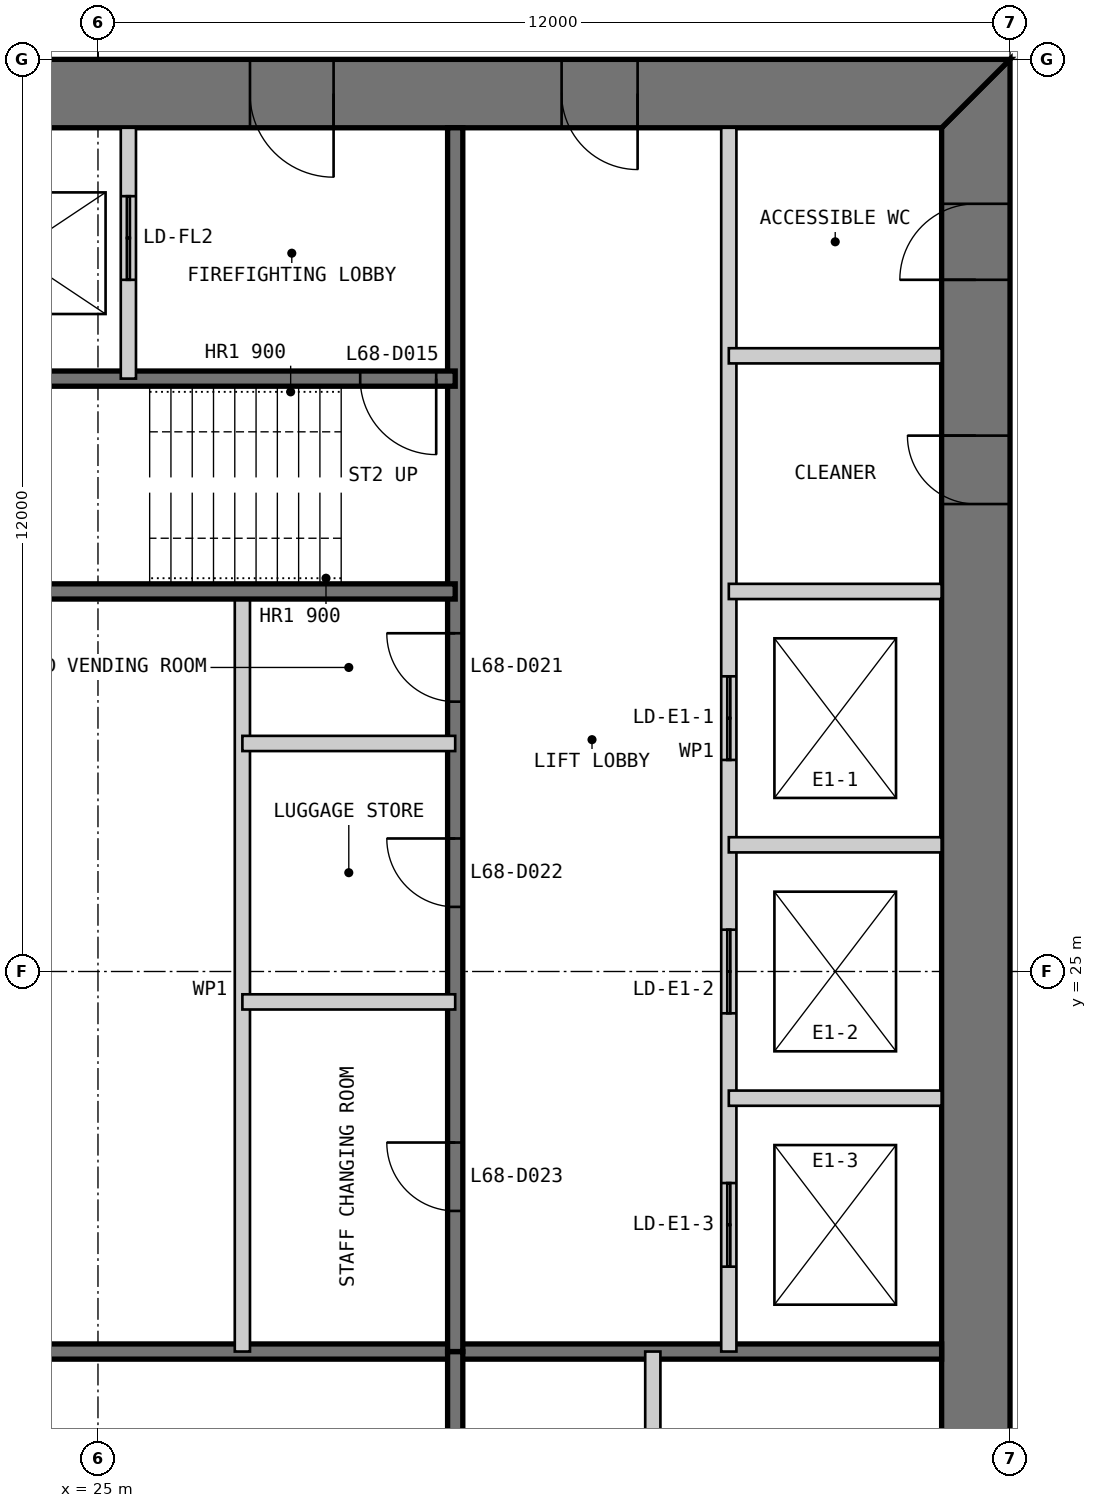
"""IFC4 building model, lengths in metres.
Left out: names, types, materials, properties, quantities, classifications, styles, units other than length and angle.
Written with IfcOpenShell. Run it as: python <this file> out.ifc"""

import sys

from ifc_helpers import new_model, si_unit, direction, frame, frame_2d, origin, place, context, subcontext, project, spatial, polyline, rectangle, outline, extrude, element, fill, save


model = new_model("IFC4")
c1 = context("Model", 3, precision=1e-05, world=origin(), true_north=direction((0.0, 1.0)))
c2 = subcontext(c1, "Body", "Model", "MODEL_VIEW")
j1 = project(units=[si_unit("LENGTHUNIT", "METRE"), si_unit("PLANEANGLEUNIT", "RADIAN")], contexts=[c1])
p1 = place(None, origin())
s1 = spatial("IfcSite", under=j1, at=p1, CompositionType="ELEMENT")
p2 = place(p1, origin())
s2 = spatial("IfcBuilding", under=s1, at=p2, CompositionType="ELEMENT")
p3 = place(p2, frame((0.0, 0.0, 283.2)))
s3 = spatial("IfcBuildingStorey", under=s2, at=p3, CompositionType="ELEMENT", Elevation=283.2)
p4 = place(p3, frame((36.55, 13.9, 0.0), z_axis=(0.0, 0.0, 1.0), x_axis=(0.0, 1.0, 0.0)))
e1 = element("IfcWall", 1, at=p4, inside=s3, PredefinedType="SHEAR", context=c2, shape_type="SweptSolid", body=[
    extrude(outline(polyline([(-0.9, -0.45), (23.1, -0.45), (22.2, 0.45), (0.0, 0.45), (-0.9, -0.45)])), origin(), (0.0, 0.0, 1.0), 3.4),
])
p5 = place(p4, frame((20.2, 0.0, 0.0)))
e2 = element("IfcOpeningElement", 2, at=p5, cuts=e1, PredefinedType="OPENING", context=c2, shape_type="SweptSolid", body=[
    extrude(rectangle(XDim=1.0, YDim=2.2, at=frame_2d((0.5, 1.1))), frame((0.0, 0.46, 0.0), z_axis=(0.0, -1.0, 0.0), x_axis=(1.0, 0.0, 0.0)), (0.0, 0.0, 1.0), 0.92),
])
p6 = place(p4, frame((17.25, 0.0, 0.0)))
e3 = element("IfcOpeningElement", 3, at=p6, cuts=e1, PredefinedType="OPENING", context=c2, shape_type="SweptSolid", body=[
    extrude(rectangle(XDim=0.9, YDim=2.2, at=frame_2d((0.45, 1.1))), frame((0.0, 0.46, 0.0), z_axis=(0.0, -1.0, 0.0), x_axis=(1.0, 0.0, 0.0)), (0.0, 0.0, 1.0), 0.92),
])
p7 = place(p3, frame((37.0, 36.55, 0.0), z_axis=(0.0, 0.0, 1.0), x_axis=(-1.0, 0.0, 0.0)))
e4 = element("IfcWall", 4, at=p7, inside=s3, PredefinedType="SHEAR", context=c2, shape_type="SweptSolid", body=[
    extrude(outline(polyline([(0.0, -0.45), (24.0, -0.45), (23.1, 0.45), (0.9, 0.45), (0.0, -0.45)])), origin(), (0.0, 0.0, 1.0), 3.4),
])
p8 = place(p7, frame((4.9, 0.0, 0.0)))
e5 = element("IfcOpeningElement", 5, at=p8, cuts=e4, PredefinedType="OPENING", context=c2, shape_type="SweptSolid", body=[
    extrude(rectangle(XDim=1.0, YDim=2.2, at=frame_2d((0.5, 1.1))), frame((0.0, 0.46, 0.0), z_axis=(0.0, -1.0, 0.0), x_axis=(1.0, 0.0, 0.0)), (0.0, 0.0, 1.0), 0.92),
])
p9 = place(p7, frame((8.9, 0.0, 0.0)))
e6 = element("IfcOpeningElement", 6, at=p9, cuts=e4, PredefinedType="OPENING", context=c2, shape_type="SweptSolid", body=[
    extrude(rectangle(XDim=1.1, YDim=2.2, at=frame_2d((0.55, 1.1))), frame((0.0, 0.46, 0.0), z_axis=(0.0, -1.0, 0.0), x_axis=(1.0, 0.0, 0.0)), (0.0, 0.0, 1.0), 0.92),
])
p10 = place(p7, frame((15.05, 0.0, 0.0)))
e7 = element("IfcOpeningElement", 7, at=p10, cuts=e4, PredefinedType="OPENING", context=c2, shape_type="SweptSolid", body=[
    extrude(rectangle(XDim=0.9, YDim=2.2, at=frame_2d((0.45, 1.1))), frame((0.0, 0.46, 0.0), z_axis=(0.0, -1.0, 0.0), x_axis=(1.0, 0.0, 0.0)), (0.0, 0.0, 1.0), 0.92),
])
p11 = place(p7, frame((17.9, 0.0, 0.0)))
e8 = element("IfcOpeningElement", 8, at=p11, cuts=e4, PredefinedType="OPENING", context=c2, shape_type="SweptSolid", body=[
    extrude(rectangle(XDim=1.0, YDim=2.2, at=frame_2d((0.5, 1.1))), frame((0.0, 0.46, 0.0), z_axis=(0.0, -1.0, 0.0), x_axis=(1.0, 0.0, 0.0)), (0.0, 0.0, 1.0), 0.92),
])
p12 = place(p7, frame((21.4, 0.0, 0.0)))
e9 = element("IfcOpeningElement", 9, at=p12, cuts=e4, PredefinedType="OPENING", context=c2, shape_type="SweptSolid", body=[
    extrude(rectangle(XDim=1.0, YDim=2.2, at=frame_2d((0.5, 1.1))), frame((0.0, 0.46, 0.0), z_axis=(0.0, -1.0, 0.0), x_axis=(1.0, 0.0, 0.0)), (0.0, 0.0, 1.0), 0.92),
])
p13 = place(p3, frame((20.3, 20.0, 0.0), z_axis=(0.0, 0.0, 1.0), x_axis=(1.0, 0.0, 0.0)))
e10 = element("IfcWall", 10, at=p13, inside=s3, PredefinedType="SOLIDWALL", context=c2, shape_type="SweptSolid", body=[
    extrude(rectangle(XDim=15.8, YDim=0.2, at=frame_2d((7.9, 0.0))), origin(), (0.0, 0.0, 1.0), 3.2),
])
p14 = place(p3, frame((29.7, 13.9, 0.0), z_axis=(0.0, 0.0, 1.0), x_axis=(0.0, 1.0, 0.0)))
e11 = element("IfcWall", 11, at=p14, inside=s3, PredefinedType="SOLIDWALL", context=c2, shape_type="SweptSolid", body=[
    extrude(rectangle(XDim=6.1, YDim=0.2, at=frame_2d((3.05, 0.0))), origin(), (0.0, 0.0, 1.0), 3.2),
])
p15 = place(p3, frame((32.3, 13.9, 0.0), z_axis=(0.0, 0.0, 1.0), x_axis=(0.0, 1.0, 0.0)))
e12 = element("IfcWall", 12, at=p15, inside=s3, PredefinedType="PARTITIONING", context=c2, shape_type="SweptSolid", body=[
    extrude(rectangle(XDim=6.1, YDim=0.2, at=frame_2d((3.05, 0.0))), origin(), (0.0, 0.0, 1.0), 3.2),
])
p16 = place(p3, frame((33.3, 36.1, 0.0), z_axis=(0.0, 0.0, 1.0), x_axis=(0.0, -1.0, 0.0)))
e13 = element("IfcWall", 13, at=p16, inside=s3, PredefinedType="PARTITIONING", context=c2, shape_type="SweptSolid", body=[
    extrude(rectangle(XDim=16.1, YDim=0.2, at=frame_2d((8.05, 0.0))), origin(), (0.0, 0.0, 1.0), 3.2),
])
p17 = place(p16, frame((7.217, 0.0, 0.0)))
e14 = element("IfcOpeningElement", 14, at=p17, cuts=e13, PredefinedType="OPENING", context=c2, shape_type="SweptSolid", body=[
    extrude(rectangle(XDim=1.1, YDim=2.2, at=frame_2d((0.55, 1.1))), frame((0.0, 0.11, 0.0), z_axis=(0.0, -1.0, 0.0), x_axis=(1.0, 0.0, 0.0)), (0.0, 0.0, 1.0), 0.22),
])
p18 = place(p16, frame((10.55, 0.0, 0.0)))
e15 = element("IfcOpeningElement", 15, at=p18, cuts=e13, PredefinedType="OPENING", context=c2, shape_type="SweptSolid", body=[
    extrude(rectangle(XDim=1.1, YDim=2.2, at=frame_2d((0.55, 1.1))), frame((0.0, 0.11, 0.0), z_axis=(0.0, -1.0, 0.0), x_axis=(1.0, 0.0, 0.0)), (0.0, 0.0, 1.0), 0.22),
])
p19 = place(p16, frame((13.883, 0.0, 0.0)))
e16 = element("IfcOpeningElement", 16, at=p19, cuts=e13, PredefinedType="OPENING", context=c2, shape_type="SweptSolid", body=[
    extrude(rectangle(XDim=1.1, YDim=2.2, at=frame_2d((0.55, 1.1))), frame((0.0, 0.11, 0.0), z_axis=(0.0, -1.0, 0.0), x_axis=(1.0, 0.0, 0.0)), (0.0, 0.0, 1.0), 0.22),
])
p20 = place(p3, frame((29.7, 36.1, 0.0), z_axis=(0.0, 0.0, 1.0), x_axis=(0.0, -1.0, 0.0)))
e17 = element("IfcWall", 17, at=p20, inside=s3, PredefinedType="SOLIDWALL", context=c2, shape_type="SweptSolid", body=[
    extrude(rectangle(XDim=16.1, YDim=0.2, at=frame_2d((8.05, 0.0))), origin(), (0.0, 0.0, 1.0), 3.2),
])
p21 = place(p20, frame((6.65, 0.0, 0.0)))
e18 = element("IfcOpeningElement", 18, at=p21, cuts=e17, PredefinedType="OPENING", context=c2, shape_type="SweptSolid", body=[
    extrude(rectangle(XDim=0.9, YDim=2.2, at=frame_2d((0.45, 1.1))), frame((0.0, 0.11, 0.0), z_axis=(0.0, -1.0, 0.0), x_axis=(1.0, 0.0, 0.0)), (0.0, 0.0, 1.0), 0.22),
])
p22 = place(p20, frame((9.35, 0.0, 0.0)))
e19 = element("IfcOpeningElement", 19, at=p22, cuts=e17, PredefinedType="OPENING", context=c2, shape_type="SweptSolid", body=[
    extrude(rectangle(XDim=0.9, YDim=2.2, at=frame_2d((0.45, 1.1))), frame((0.0, 0.11, 0.0), z_axis=(0.0, -1.0, 0.0), x_axis=(1.0, 0.0, 0.0)), (0.0, 0.0, 1.0), 0.22),
])
p23 = place(p20, frame((13.35, 0.0, 0.0)))
e20 = element("IfcOpeningElement", 20, at=p23, cuts=e17, PredefinedType="OPENING", context=c2, shape_type="SweptSolid", body=[
    extrude(rectangle(XDim=0.9, YDim=2.2, at=frame_2d((0.45, 1.1))), frame((0.0, 0.11, 0.0), z_axis=(0.0, -1.0, 0.0), x_axis=(1.0, 0.0, 0.0)), (0.0, 0.0, 1.0), 0.22),
])
for number, where, z_axis, x_axis in (
    (21, (36.1, 30.0, 0.0), (0.0, 0.0, 1.0), (-1.0, 0.0, 0.0)),
    (22, (36.1, 26.667, 0.0), (0.0, 0.0, 1.0), (-1.0, 0.0, 0.0)),
    (23, (36.1, 23.333, 0.0), (0.0, 0.0, 1.0), (-1.0, 0.0, 0.0)),
):
    element("IfcWall", number, at=place(p3, frame(where, z_axis=z_axis, x_axis=x_axis)), inside=s3, PredefinedType="PARTITIONING", context=c2, shape_type="SweptSolid", body=[
        extrude(rectangle(XDim=2.8, YDim=0.2, at=frame_2d((1.4, 0.0))), origin(), (0.0, 0.0, 1.0), 3.2),
    ])
p24 = place(p3, frame((26.9, 30.0, 0.0), z_axis=(0.0, 0.0, 1.0), x_axis=(0.0, -1.0, 0.0)))
e24 = element("IfcWall", 24, at=p24, inside=s3, PredefinedType="PARTITIONING", context=c2, shape_type="SweptSolid", body=[
    extrude(rectangle(XDim=10.0, YDim=0.2, at=frame_2d((5.0, 0.0))), origin(), (0.0, 0.0, 1.0), 3.2),
])
p25 = place(p3, frame((29.7, 32.8, 0.0), z_axis=(0.0, 0.0, 1.0), x_axis=(-1.0, 0.0, 0.0)))
e25 = element("IfcWall", 25, at=p25, inside=s3, PredefinedType="SOLIDWALL", context=c2, shape_type="SweptSolid", body=[
    extrude(rectangle(XDim=9.4, YDim=0.2, at=frame_2d((4.7, 0.0))), origin(), (0.0, 0.0, 1.0), 3.2),
])
p26 = place(p25, frame((0.25, 0.0, 0.0)))
e26 = element("IfcOpeningElement", 26, at=p26, cuts=e25, PredefinedType="OPENING", context=c2, shape_type="SweptSolid", body=[
    extrude(rectangle(XDim=1.0, YDim=2.2, at=frame_2d((0.5, 1.1))), frame((0.0, 0.11, 0.0), z_axis=(0.0, -1.0, 0.0), x_axis=(1.0, 0.0, 0.0)), (0.0, 0.0, 1.0), 0.22),
])
p27 = place(p3, frame((29.7, 30.0, 0.0), z_axis=(0.0, 0.0, 1.0), x_axis=(-1.0, 0.0, 0.0)))
e27 = element("IfcWall", 27, at=p27, inside=s3, PredefinedType="SOLIDWALL", context=c2, shape_type="SweptSolid", body=[
    extrude(rectangle(XDim=15.8, YDim=0.2, at=frame_2d((7.9, 0.0))), origin(), (0.0, 0.0, 1.0), 3.2),
])
p28 = place(p3, frame((25.4, 36.1, 0.0), z_axis=(0.0, 0.0, 1.0), x_axis=(0.0, -1.0, 0.0)))
e28 = element("IfcWall", 28, at=p28, inside=s3, PredefinedType="PARTITIONING", context=c2, shape_type="SweptSolid", body=[
    extrude(rectangle(XDim=3.3, YDim=0.2, at=frame_2d((1.65, 0.0))), origin(), (0.0, 0.0, 1.0), 3.2),
])
p29 = place(p28, frame((0.9, 0.0, 0.0)))
e29 = element("IfcOpeningElement", 29, at=p29, cuts=e28, PredefinedType="OPENING", context=c2, shape_type="SweptSolid", body=[
    extrude(rectangle(XDim=1.1, YDim=2.2, at=frame_2d((0.55, 1.1))), frame((0.0, 0.11, 0.0), z_axis=(0.0, -1.0, 0.0), x_axis=(1.0, 0.0, 0.0)), (0.0, 0.0, 1.0), 0.22),
])
for number, where, z_axis, x_axis in (
    (30, (36.1, 33.1, 0.0), (0.0, 0.0, 1.0), (-1.0, 0.0, 0.0)),
    (31, (29.7, 28.0, 0.0), (0.0, 0.0, 1.0), (-1.0, 0.0, 0.0)),
    (32, (29.7, 24.6, 0.0), (0.0, 0.0, 1.0), (-1.0, 0.0, 0.0)),
):
    element("IfcWall", number, at=place(p3, frame(where, z_axis=z_axis, x_axis=x_axis)), inside=s3, PredefinedType="PARTITIONING", context=c2, shape_type="SweptSolid", body=[
        extrude(rectangle(XDim=2.8, YDim=0.2, at=frame_2d((1.4, 0.0))), origin(), (0.0, 0.0, 1.0), 3.2),
    ])
p30 = place(p8, origin())
e33 = element("IfcDoor", 33, at=p30, inside=s3, OperationType="SINGLE_SWING_LEFT", PredefinedType="DOOR", context=c2, shape_type="SweptSolid", body=[
    extrude(rectangle(XDim=1.0, YDim=2.2, at=frame_2d((0.5, 1.1))), frame((0.0, 0.025, 0.0), z_axis=(0.0, -1.0, 0.0), x_axis=(1.0, 0.0, 0.0)), (0.0, 0.0, 1.0), 0.05),
    extrude(outline(polyline([(0.0, 0.0), (0.04, 0.0), (0.04, 2.16), (0.96, 2.16), (0.96, 0.0), (1.0, 0.0), (1.0, 2.2), (0.0, 2.2), (0.0, 0.0)])), frame((0.0, 0.3, 0.0), z_axis=(0.0, -1.0, 0.0), x_axis=(1.0, 0.0, 0.0)), (0.0, 0.0, 1.0), 0.6),
])
fill(e5, e33)
p31 = place(p9, origin())
e34 = element("IfcDoor", 34, at=p31, inside=s3, OperationType="SINGLE_SWING_LEFT", PredefinedType="DOOR", context=c2, shape_type="SweptSolid", body=[
    extrude(rectangle(XDim=1.1, YDim=2.2, at=frame_2d((0.55, 1.1))), frame((0.0, 0.025, 0.0), z_axis=(0.0, -1.0, 0.0), x_axis=(1.0, 0.0, 0.0)), (0.0, 0.0, 1.0), 0.05),
    extrude(outline(polyline([(0.0, 0.0), (0.04, 0.0), (0.04, 2.16), (1.06, 2.16), (1.06, 0.0), (1.1, 0.0), (1.1, 2.2), (0.0, 2.2), (0.0, 0.0)])), frame((0.0, 0.3, 0.0), z_axis=(0.0, -1.0, 0.0), x_axis=(1.0, 0.0, 0.0)), (0.0, 0.0, 1.0), 0.6),
])
fill(e6, e34)
p32 = place(p26, origin())
e35 = element("IfcDoor", 35, at=p32, inside=s3, OperationType="SINGLE_SWING_LEFT", PredefinedType="DOOR", context=c2, shape_type="SweptSolid", body=[
    extrude(rectangle(XDim=1.0, YDim=2.2, at=frame_2d((0.5, 1.1))), frame((0.0, 0.025, 0.0), z_axis=(0.0, -1.0, 0.0), x_axis=(1.0, 0.0, 0.0)), (0.0, 0.0, 1.0), 0.05),
])
fill(e26, e35)
p33 = place(p5, origin())
e36 = element("IfcDoor", 36, at=p33, inside=s3, OperationType="SINGLE_SWING_LEFT", PredefinedType="DOOR", context=c2, shape_type="SweptSolid", body=[
    extrude(rectangle(XDim=1.0, YDim=2.2, at=frame_2d((0.5, 1.1))), frame((0.0, 0.025, 0.0), z_axis=(0.0, -1.0, 0.0), x_axis=(1.0, 0.0, 0.0)), (0.0, 0.0, 1.0), 0.05),
    extrude(outline(polyline([(0.0, 0.0), (0.04, 0.0), (0.04, 2.16), (0.96, 2.16), (0.96, 0.0), (1.0, 0.0), (1.0, 2.2), (0.0, 2.2), (0.0, 0.0)])), frame((0.0, 0.3, 0.0), z_axis=(0.0, -1.0, 0.0), x_axis=(1.0, 0.0, 0.0)), (0.0, 0.0, 1.0), 0.6),
])
fill(e2, e36)
p34 = place(p6, origin())
e37 = element("IfcDoor", 37, at=p34, inside=s3, OperationType="SINGLE_SWING_RIGHT", PredefinedType="DOOR", context=c2, shape_type="SweptSolid", body=[
    extrude(rectangle(XDim=0.9, YDim=2.2, at=frame_2d((0.45, 1.1))), frame((0.0, 0.025, 0.0), z_axis=(0.0, -1.0, 0.0), x_axis=(1.0, 0.0, 0.0)), (0.0, 0.0, 1.0), 0.05),
    extrude(outline(polyline([(0.0, 0.0), (0.04, 0.0), (0.04, 2.16), (0.86, 2.16), (0.86, 0.0), (0.9, 0.0), (0.9, 2.2), (0.0, 2.2), (0.0, 0.0)])), frame((0.0, 0.3, 0.0), z_axis=(0.0, -1.0, 0.0), x_axis=(1.0, 0.0, 0.0)), (0.0, 0.0, 1.0), 0.6),
])
fill(e3, e37)
p35 = place(p21, frame((0.9, 0.0, 0.0), z_axis=(0.0, 0.0, 1.0), x_axis=(-1.0, 0.0, 0.0)))
e38 = element("IfcDoor", 38, at=p35, inside=s3, OperationType="SINGLE_SWING_RIGHT", PredefinedType="DOOR", context=c2, shape_type="SweptSolid", body=[
    extrude(rectangle(XDim=0.9, YDim=2.2, at=frame_2d((0.45, 1.1))), frame((0.0, 0.025, 0.0), z_axis=(0.0, -1.0, 0.0), x_axis=(1.0, 0.0, 0.0)), (0.0, 0.0, 1.0), 0.05),
])
fill(e18, e38)
p36 = place(p22, frame((0.9, 0.0, 0.0), z_axis=(0.0, 0.0, 1.0), x_axis=(-1.0, 0.0, 0.0)))
e39 = element("IfcDoor", 39, at=p36, inside=s3, OperationType="SINGLE_SWING_RIGHT", PredefinedType="DOOR", context=c2, shape_type="SweptSolid", body=[
    extrude(rectangle(XDim=0.9, YDim=2.2, at=frame_2d((0.45, 1.1))), frame((0.0, 0.025, 0.0), z_axis=(0.0, -1.0, 0.0), x_axis=(1.0, 0.0, 0.0)), (0.0, 0.0, 1.0), 0.05),
])
fill(e19, e39)
p37 = place(p23, frame((0.9, 0.0, 0.0), z_axis=(0.0, 0.0, 1.0), x_axis=(-1.0, 0.0, 0.0)))
e40 = element("IfcDoor", 40, at=p37, inside=s3, OperationType="SINGLE_SWING_RIGHT", PredefinedType="DOOR", context=c2, shape_type="SweptSolid", body=[
    extrude(rectangle(XDim=0.9, YDim=2.2, at=frame_2d((0.45, 1.1))), frame((0.0, 0.025, 0.0), z_axis=(0.0, -1.0, 0.0), x_axis=(1.0, 0.0, 0.0)), (0.0, 0.0, 1.0), 0.05),
])
fill(e20, e40)
p38 = place(p29, origin())
e41 = element("IfcDoor", 41, at=p38, inside=s3, OperationType="DOUBLE_DOOR_SLIDING", PredefinedType="DOOR", context=c2, shape_type="SweptSolid", body=[
    extrude(rectangle(XDim=1.1, YDim=2.2, at=frame_2d((0.55, 1.1))), frame((0.0, 0.025, 0.0), z_axis=(0.0, -1.0, 0.0), x_axis=(1.0, 0.0, 0.0)), (0.0, 0.0, 1.0), 0.05),
])
fill(e29, e41)
p39 = place(p17, origin())
e42 = element("IfcDoor", 42, at=p39, inside=s3, OperationType="DOUBLE_DOOR_SLIDING", PredefinedType="DOOR", context=c2, shape_type="SweptSolid", body=[
    extrude(rectangle(XDim=1.1, YDim=2.2, at=frame_2d((0.55, 1.1))), frame((0.0, 0.025, 0.0), z_axis=(0.0, -1.0, 0.0), x_axis=(1.0, 0.0, 0.0)), (0.0, 0.0, 1.0), 0.05),
])
fill(e14, e42)
p40 = place(p18, origin())
e43 = element("IfcDoor", 43, at=p40, inside=s3, OperationType="DOUBLE_DOOR_SLIDING", PredefinedType="DOOR", context=c2, shape_type="SweptSolid", body=[
    extrude(rectangle(XDim=1.1, YDim=2.2, at=frame_2d((0.55, 1.1))), frame((0.0, 0.025, 0.0), z_axis=(0.0, -1.0, 0.0), x_axis=(1.0, 0.0, 0.0)), (0.0, 0.0, 1.0), 0.05),
])
fill(e15, e43)
p41 = place(p19, origin())
e44 = element("IfcDoor", 44, at=p41, inside=s3, OperationType="DOUBLE_DOOR_SLIDING", PredefinedType="DOOR", context=c2, shape_type="SweptSolid", body=[
    extrude(rectangle(XDim=1.1, YDim=2.2, at=frame_2d((0.55, 1.1))), frame((0.0, 0.025, 0.0), z_axis=(0.0, -1.0, 0.0), x_axis=(1.0, 0.0, 0.0)), (0.0, 0.0, 1.0), 0.05),
])
fill(e16, e44)
save(model, sys.argv[1])
